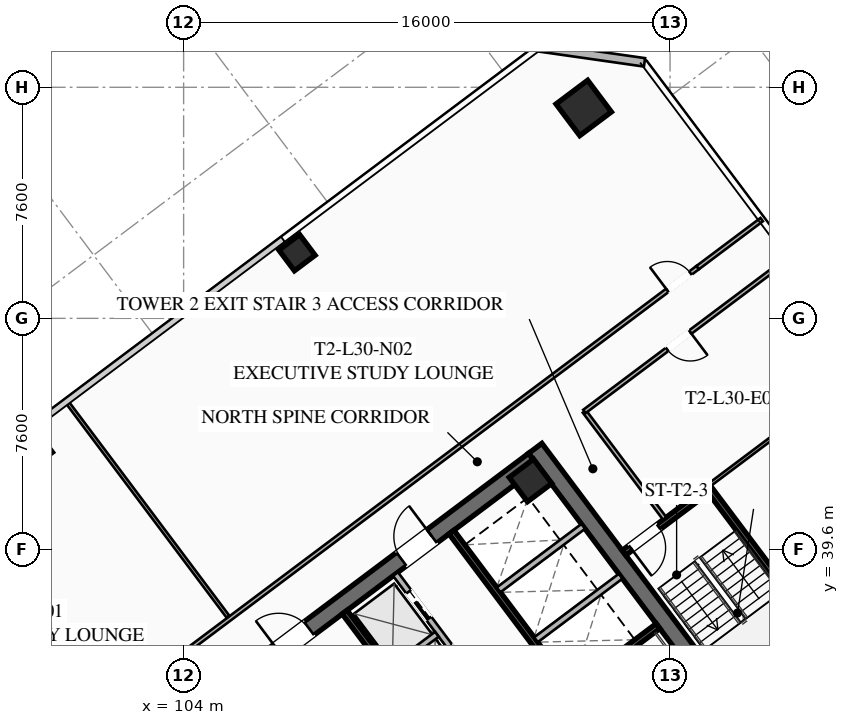
"""IFC4 building model, lengths in metres.
Left out: names, types, materials, properties, quantities, classifications, styles, units other than length and angle.
Written with IfcOpenShell. Run it as: python <this file> out.ifc"""

import sys

from ifc_helpers import new_model, si_unit, direction, frame, frame_2d, origin, origin_2d, place, context, subcontext, project, spatial, rectangle, hollow_rectangle, extrude, element, fill, save


model = new_model("IFC4")
c1 = context("Model", 3, precision=1e-05, world=origin(), true_north=direction((0.0, 1.0)))
c2 = subcontext(c1, "Body", "Model", "MODEL_VIEW")
j1 = project(units=[si_unit("LENGTHUNIT", "METRE"), si_unit("PLANEANGLEUNIT", "RADIAN")], contexts=[c1])
p1 = place(None, origin())
s1 = spatial("IfcSite", under=j1, at=p1, CompositionType="ELEMENT")
p2 = place(p1, origin())
s2 = spatial("IfcBuilding", under=s1, at=p2, CompositionType="ELEMENT")
p3 = place(p2, frame((0.0, 0.0, 114.4)))
s3 = spatial("IfcBuildingStorey", under=s2, at=p3, CompositionType="ELEMENT", Elevation=114.4)
p4 = place(p3, frame((115.564, 42.923, 0.0), z_axis=(0.0, 0.0, 1.0), x_axis=(0.600005007985, -0.799996243986, 0.0)))
e1 = element("IfcWall", 1, at=p4, inside=s3, PredefinedType="SHEAR", context=c2, shape_type="SweptSolid", body=[
    extrude(rectangle(XDim=15.6, YDim=0.55, at=frame_2d((7.8, 0.0))), origin(), (0.0, 0.0, 1.0), 3.55),
])
p5 = place(p3, frame((103.461, 33.502, 0.0), z_axis=(0.0, 0.0, 1.0), x_axis=(0.799998054672, 0.600002593761, 0.0)))
e2 = element("IfcWall", 2, at=p5, inside=s3, PredefinedType="SHEAR", context=c2, shape_type="SweptSolid", body=[
    extrude(rectangle(XDim=15.06, YDim=0.55, at=frame_2d((7.53, 0.0))), origin(), (0.0, 0.0, 1.0), 3.55),
])
p6 = place(p5, frame((4.58, 0.0, 0.0)))
e3 = element("IfcOpeningElement", 3, at=p6, cuts=e2, PredefinedType="OPENING", context=c2, shape_type="SweptSolid", body=[
    extrude(rectangle(XDim=1.25, YDim=2.25, at=frame_2d((0.625, 1.125))), frame((0.0, 0.285, 0.0), z_axis=(0.0, -1.0, 0.0), x_axis=(1.0, 0.0, 0.0)), (0.0, 0.0, 1.0), 0.57),
])
p7 = place(p5, frame((9.63, 0.0, 0.0)))
e4 = element("IfcOpeningElement", 4, at=p7, cuts=e2, PredefinedType="OPENING", context=c2, shape_type="SweptSolid", body=[
    extrude(rectangle(XDim=1.25, YDim=2.25, at=frame_2d((0.625, 1.125))), frame((0.0, 0.285, 0.0), z_axis=(0.0, -1.0, 0.0), x_axis=(1.0, 0.0, 0.0)), (0.0, 0.0, 1.0), 0.57),
])
p8 = place(p3, frame((115.41, 41.87, 0.0), z_axis=(0.0, 0.0, 1.0), x_axis=(0.799999996291, 0.600000004945, 0.0)))
e5 = element("IfcColumn", 5, at=p8, inside=s3, PredefinedType="COLUMN", context=c2, shape_type="SweptSolid", body=[
    extrude(hollow_rectangle(XDim=1.0, YDim=1.0, WallThickness=0.04, at=origin_2d()), origin(), (0.0, 0.0, 1.0), 3.37),
])
p9 = place(p3, frame((117.16, 54.12, 0.0), z_axis=(0.0, 0.0, 1.0), x_axis=(0.799999996291, 0.600000004945, 0.0)))
e6 = element("IfcColumn", 6, at=p9, inside=s3, PredefinedType="COLUMN", context=c2, shape_type="SweptSolid", body=[
    extrude(hollow_rectangle(XDim=1.3, YDim=1.3, WallThickness=0.05, at=origin_2d()), origin(), (0.0, 0.0, 1.0), 3.37),
])
for number, where, z_axis, x_axis in (
    (7, (107.73, 49.36, 0.0), (0.0, 0.0, 1.0), (0.8, 0.6, 0.0)),
    (8, (99.09, 42.88, 0.0), (0.0, 0.0, 1.0), (0.8, 0.6, 0.0)),
):
    element("IfcColumn", number, at=place(p3, frame(where, z_axis=z_axis, x_axis=x_axis)), inside=s3, PredefinedType="COLUMN", context=c2, shape_type="SweptSolid", body=[
        extrude(hollow_rectangle(XDim=0.85, YDim=0.85, WallThickness=0.035, at=origin_2d()), origin(), (0.0, 0.0, 1.0), 3.37),
    ])
p10 = place(p3, frame((115.66, 56.12, 0.0), z_axis=(0.0, 0.0, 1.0), x_axis=(0.989949493661, -0.141421356237, 0.0)))
e9 = element("IfcWall", 9, at=p10, inside=s3, PredefinedType="SOLIDWALL", context=c2, shape_type="SweptSolid", body=[
    extrude(rectangle(XDim=3.536, YDim=0.28, at=frame_2d((1.768, 0.0))), origin(), (0.0, 0.0, 1.0), 3.37),
])
p11 = place(p3, frame((116.54, 34.78, 0.0), z_axis=(0.0, 0.0, 1.0), x_axis=(0.800015298837, 0.599979601008, 0.0)))
e10 = element("IfcWall", 10, at=p11, inside=s3, PredefinedType="SHEAR", context=c2, shape_type="SweptSolid", body=[
    extrude(rectangle(XDim=3.83, YDim=0.2, at=frame_2d((1.915, 0.0))), origin(), (0.0, 0.0, 1.0), 3.37),
])
p12 = place(p3, frame((117.998, 25.936, 0.0), z_axis=(0.0, 0.0, 1.0), x_axis=(-0.600002693989, 0.799997979501, 0.0)))
e11 = element("IfcWall", 11, at=p12, inside=s3, PredefinedType="SHEAR", context=c2, shape_type="SweptSolid", body=[
    extrude(rectangle(XDim=14.5, YDim=0.2, at=frame_2d((7.25, 0.0))), origin(), (0.0, 0.0, 1.0), 3.37),
])
p13 = place(p3, frame((112.81, 40.17, 0.0), z_axis=(0.0, 0.0, 1.0), x_axis=(0.599993943644, -0.800004542231, 0.0)))
e12 = element("IfcWall", 12, at=p13, inside=s3, PredefinedType="SHEAR", context=c2, shape_type="SweptSolid", body=[
    extrude(rectangle(XDim=6.45, YDim=0.2, at=frame_2d((3.225, 0.0))), origin(), (0.0, 0.0, 1.0), 3.37),
])
for number, where, z_axis, x_axis in (
    (13, (115.59, 36.63, 0.0), (0.0, 0.0, 1.0), (0.8, 0.6, 0.0)),
    (14, (114.36, 38.27, 0.0), (0.0, 0.0, 1.0), (0.8, 0.6, 0.0)),
):
    element("IfcWall", number, at=place(p3, frame(where, z_axis=z_axis, x_axis=x_axis)), inside=s3, PredefinedType="SOLIDWALL", context=c2, shape_type="SweptSolid", body=[
        extrude(rectangle(XDim=3.48, YDim=0.2, at=frame_2d((1.74, 0.0))), origin(), (0.0, 0.0, 1.0), 3.37),
    ])
p14 = place(p3, frame((115.11, 33.27, 0.0), z_axis=(0.0, 0.0, 1.0), x_axis=(-0.600011322243, 0.799991508192, 0.0)))
e15 = element("IfcWall", 15, at=p14, inside=s3, PredefinedType="SOLIDWALL", context=c2, shape_type="SweptSolid", body=[
    extrude(rectangle(XDim=6.9, YDim=0.2, at=frame_2d((3.45, 0.0))), origin(), (0.0, 0.0, 1.0), 3.37),
])
p15 = place(p14, frame((0.575, 0.0, 0.0)))
e16 = element("IfcOpeningElement", 16, at=p15, cuts=e15, PredefinedType="OPENING", context=c2, shape_type="SweptSolid", body=[
    extrude(rectangle(XDim=1.1, YDim=2.2, at=frame_2d((0.55, 1.1))), frame((0.0, 0.11, 0.0), z_axis=(0.0, -1.0, 0.0), x_axis=(1.0, 0.0, 0.0)), (0.0, 0.0, 1.0), 0.22),
])
p16 = place(p14, frame((2.825, 0.0, 0.0)))
e17 = element("IfcOpeningElement", 17, at=p16, cuts=e15, PredefinedType="OPENING", context=c2, shape_type="SweptSolid", body=[
    extrude(rectangle(XDim=1.1, YDim=2.2, at=frame_2d((0.55, 1.1))), frame((0.0, 0.11, 0.0), z_axis=(0.0, -1.0, 0.0), x_axis=(1.0, 0.0, 0.0)), (0.0, 0.0, 1.0), 0.22),
])
p17 = place(p14, frame((5.075, 0.0, 0.0)))
e18 = element("IfcOpeningElement", 18, at=p17, cuts=e15, PredefinedType="OPENING", context=c2, shape_type="SweptSolid", body=[
    extrude(rectangle(XDim=1.1, YDim=2.2, at=frame_2d((0.55, 1.1))), frame((0.0, 0.11, 0.0), z_axis=(0.0, -1.0, 0.0), x_axis=(1.0, 0.0, 0.0)), (0.0, 0.0, 1.0), 0.22),
])
p18 = place(p3, frame((110.826, 35.682, 0.0), z_axis=(0.0, 0.0, 1.0), x_axis=(0.799984418148, 0.600020775241, 0.0)))
e19 = element("IfcWall", 19, at=p18, inside=s3, PredefinedType="SOLIDWALL", context=c2, shape_type="SweptSolid", body=[
    extrude(rectangle(XDim=1.88, YDim=0.2, at=frame_2d((0.94, 0.0))), origin(), (0.0, 0.0, 1.0), 3.37),
])
p19 = place(p3, frame((125.304, 36.228, 0.0), z_axis=(0.0, 0.0, 1.0), x_axis=(-0.59998851072, 0.800008616831, 0.0)))
e20 = element("IfcWall", 20, at=p19, inside=s3, PredefinedType="SHEAR", context=c2, shape_type="SweptSolid", body=[
    extrude(rectangle(XDim=6.8, YDim=0.2, at=frame_2d((3.4, 0.0))), origin(), (0.0, 0.0, 1.0), 3.37),
])
p20 = place(p3, frame((121.204, 41.528, 0.0), z_axis=(0.0, 0.0, 1.0), x_axis=(-0.800017232136, -0.599977023131, 0.0)))
e21 = element("IfcWall", 21, at=p20, inside=s3, PredefinedType="SHEAR", context=c2, shape_type="SweptSolid", body=[
    extrude(rectangle(XDim=3.4, YDim=0.2, at=frame_2d((1.7, 0.0))), origin(), (0.0, 0.0, 1.0), 3.37),
])
p21 = place(p20, frame((1.975, 0.0, 0.0)))
e22 = element("IfcOpeningElement", 22, at=p21, cuts=e21, PredefinedType="OPENING", context=c2, shape_type="SweptSolid", body=[
    extrude(rectangle(XDim=1.15, YDim=2.2, at=frame_2d((0.575, 1.1))), frame((0.0, 0.11, 0.0), z_axis=(0.0, -1.0, 0.0), x_axis=(1.0, 0.0, 0.0)), (0.0, 0.0, 1.0), 0.22),
])
p22 = place(p3, frame((119.824, 40.618, 0.0), z_axis=(0.0, 0.0, 1.0), x_axis=(-0.599982243973, 0.800013316712, 0.0)))
e23 = element("IfcWall", 23, at=p22, inside=s3, PredefinedType="PARTITIONING", context=c2, shape_type="SweptSolid", body=[
    extrude(rectangle(XDim=4.4, YDim=0.135, at=frame_2d((2.2, 0.0))), origin(), (0.0, 0.0, 1.0), 2.723),
])
p23 = place(p3, frame((95.87, 30.09, 0.0), z_axis=(0.0, 0.0, 1.0), x_axis=(0.799997191971, 0.600003744021, 0.0)))
e24 = element("IfcWall", 24, at=p23, inside=s3, PredefinedType="PARTITIONING", context=c2, shape_type="SweptSolid", body=[
    extrude(rectangle(XDim=31.3, YDim=0.135, at=frame_2d((15.65, 0.0))), origin(), (0.0, 0.0, 1.0), 2.723),
])
p24 = place(p23, frame((0.3, 0.0, 0.0)))
e25 = element("IfcOpeningElement", 25, at=p24, cuts=e24, PredefinedType="OPENING", context=c2, shape_type="SweptSolid", body=[
    extrude(rectangle(XDim=0.95, YDim=2.05, at=frame_2d((0.475, 1.025))), frame((0.0, 0.077, 0.0), z_axis=(0.0, -1.0, 0.0), x_axis=(1.0, 0.0, 0.0)), (0.0, 0.0, 1.0), 0.155),
])
p25 = place(p23, frame((30.05, 0.0, 0.0)))
e26 = element("IfcOpeningElement", 26, at=p25, cuts=e24, PredefinedType="OPENING", context=c2, shape_type="SweptSolid", body=[
    extrude(rectangle(XDim=0.95, YDim=2.05, at=frame_2d((0.475, 1.025))), frame((0.0, 0.077, 0.0), z_axis=(0.0, -1.0, 0.0), x_axis=(1.0, 0.0, 0.0)), (0.0, 0.0, 1.0), 0.155),
])
p26 = place(p3, frame((120.91, 48.87, 0.0), z_axis=(0.0, 0.0, 1.0), x_axis=(0.80002227902, 0.599970293491, 0.0)))
e27 = element("IfcWall", 27, at=p26, inside=s3, PredefinedType="PARTITIONING", context=c2, shape_type="SweptSolid", body=[
    extrude(rectangle(XDim=2.63, YDim=0.135, at=frame_2d((1.315, 0.0))), origin(), (0.0, 0.0, 1.0), 2.723),
])
p27 = place(p3, frame((105.462, 37.384, 0.0), z_axis=(0.0, 0.0, 1.0), x_axis=(-0.599982344389, 0.800013241404, 0.0)))
e28 = element("IfcWall", 28, at=p27, inside=s3, PredefinedType="PARTITIONING", context=c2, shape_type="SweptSolid", body=[
    extrude(rectangle(XDim=8.85, YDim=0.11, at=frame_2d((4.425, 0.0))), origin(), (0.0, 0.0, 1.0), 2.723),
])
p28 = place(p3, frame((123.944, 49.208, 0.0), z_axis=(0.0, 0.0, 1.0), x_axis=(-0.799996532921, -0.600004622744, 0.0)))
e29 = element("IfcWall", 29, at=p28, inside=s3, PredefinedType="PARTITIONING", context=c2, shape_type="SweptSolid", body=[
    extrude(rectangle(XDim=8.45, YDim=0.135, at=frame_2d((4.225, 0.0))), origin(), (0.0, 0.0, 1.0), 2.723),
])
p29 = place(p28, frame((4.1, 0.0, 0.0)))
e30 = element("IfcOpeningElement", 30, at=p29, cuts=e29, PredefinedType="OPENING", context=c2, shape_type="SweptSolid", body=[
    extrude(rectangle(XDim=0.95, YDim=2.05, at=frame_2d((0.475, 1.025))), frame((0.0, 0.077, 0.0), z_axis=(0.0, -1.0, 0.0), x_axis=(1.0, 0.0, 0.0)), (0.0, 0.0, 1.0), 0.155),
])
p30 = place(p3, frame((126.584, 45.688, 0.0), z_axis=(0.0, 0.0, 1.0), x_axis=(-0.800004438899, -0.599994081423, 0.0)))
e31 = element("IfcWall", 31, at=p30, inside=s3, PredefinedType="PARTITIONING", context=c2, shape_type="SweptSolid", body=[
    extrude(rectangle(XDim=6.6, YDim=0.11, at=frame_2d((3.3, 0.0))), origin(), (0.0, 0.0, 1.0), 2.723),
])
p31 = place(p6, origin())
e32 = element("IfcDoor", 32, at=p31, inside=s3, OperationType="SINGLE_SWING_LEFT", PredefinedType="DOOR", context=c2, shape_type="SweptSolid", body=[
    extrude(rectangle(XDim=1.25, YDim=2.25, at=frame_2d((0.625, 1.125))), frame((0.0, 0.025, 0.0), z_axis=(0.0, -1.0, 0.0), x_axis=(1.0, 0.0, 0.0)), (0.0, 0.0, 1.0), 0.05),
])
fill(e3, e32)
p32 = place(p7, origin())
e33 = element("IfcDoor", 33, at=p32, inside=s3, OperationType="SINGLE_SWING_RIGHT", PredefinedType="DOOR", context=c2, shape_type="SweptSolid", body=[
    extrude(rectangle(XDim=1.25, YDim=2.25, at=frame_2d((0.625, 1.125))), frame((0.0, 0.025, 0.0), z_axis=(0.0, -1.0, 0.0), x_axis=(1.0, 0.0, 0.0)), (0.0, 0.0, 1.0), 0.05),
])
fill(e4, e33)
p33 = place(p21, origin())
e34 = element("IfcDoor", 34, at=p33, inside=s3, OperationType="SINGLE_SWING_RIGHT", PredefinedType="DOOR", context=c2, shape_type="SweptSolid", body=[
    extrude(rectangle(XDim=1.15, YDim=2.2, at=frame_2d((0.575, 1.1))), frame((0.0, 0.025, 0.0), z_axis=(0.0, -1.0, 0.0), x_axis=(1.0, 0.0, 0.0)), (0.0, 0.0, 1.0), 0.05),
])
fill(e22, e34)
p34 = place(p25, origin())
e35 = element("IfcDoor", 35, at=p34, inside=s3, OperationType="SINGLE_SWING_LEFT", PredefinedType="DOOR", context=c2, shape_type="SweptSolid", body=[
    extrude(rectangle(XDim=0.95, YDim=2.05, at=frame_2d((0.475, 1.025))), frame((0.0, 0.025, 0.0), z_axis=(0.0, -1.0, 0.0), x_axis=(1.0, 0.0, 0.0)), (0.0, 0.0, 1.0), 0.05),
])
fill(e26, e35)
p35 = place(p29, origin())
e36 = element("IfcDoor", 36, at=p35, inside=s3, OperationType="SINGLE_SWING_LEFT", PredefinedType="DOOR", context=c2, shape_type="SweptSolid", body=[
    extrude(rectangle(XDim=0.95, YDim=2.05, at=frame_2d((0.475, 1.025))), frame((0.0, 0.025, 0.0), z_axis=(0.0, -1.0, 0.0), x_axis=(1.0, 0.0, 0.0)), (0.0, 0.0, 1.0), 0.05),
])
fill(e30, e36)
p36 = place(p17, origin())
e37 = element("IfcDoor", 37, at=p36, inside=s3, OperationType="SLIDING_TO_LEFT", PredefinedType="DOOR", context=c2, shape_type="SweptSolid", body=[
    extrude(rectangle(XDim=1.1, YDim=2.2, at=frame_2d((0.55, 1.1))), frame((0.0, 0.025, 0.0), z_axis=(0.0, -1.0, 0.0), x_axis=(1.0, 0.0, 0.0)), (0.0, 0.0, 1.0), 0.05),
])
fill(e18, e37)
save(model, sys.argv[1])
